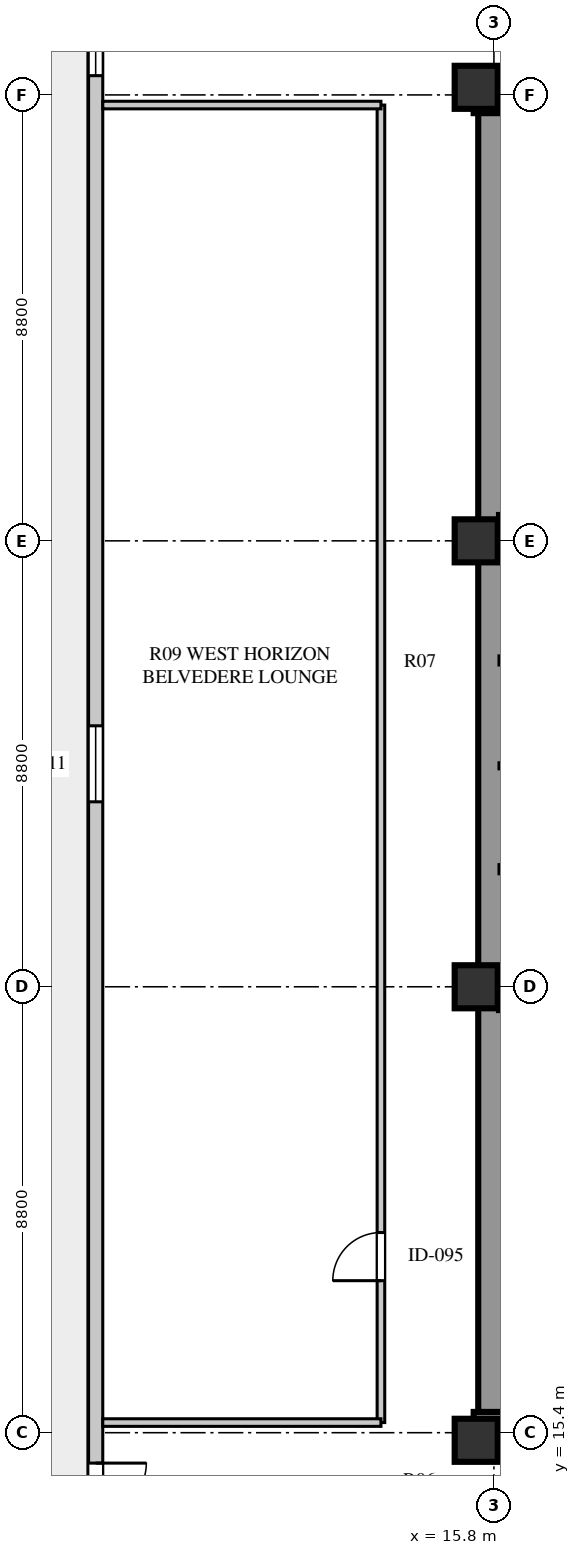
"""IFC4 building model, lengths in metres.
Left out: names, types, materials, properties, quantities, classifications, styles, units other than length and angle.
Written with IfcOpenShell. Run it as: python <this file> out.ifc"""

import sys

from ifc_helpers import new_model, si_unit, direction, frame, frame_2d, origin, origin_2d, place, context, subcontext, project, spatial, rectangle, extrude, element, fill, save


model = new_model("IFC4")
c1 = context("Model", 3, precision=1e-05, world=origin(), true_north=direction((0.0, 1.0)))
c2 = subcontext(c1, "Body", "Model", "MODEL_VIEW")
j1 = project(units=[si_unit("LENGTHUNIT", "METRE"), si_unit("PLANEANGLEUNIT", "RADIAN")], contexts=[c1])
p1 = place(None, origin())
s1 = spatial("IfcSite", under=j1, at=p1, CompositionType="ELEMENT")
p2 = place(p1, origin())
s2 = spatial("IfcBuilding", under=s1, at=p2, CompositionType="ELEMENT")
p3 = place(p2, frame((0.0, 0.0, 208.9)))
s3 = spatial("IfcBuildingStorey", under=s2, at=p3, CompositionType="ELEMENT", Elevation=208.9)
for number, where, z_axis, x_axis in (
    (1, (15.4, 15.56, 0.0), (0.0, 0.0, 1.0), (1.0, 0.0, 0.0)),
    (2, (15.4, 41.69, 0.0), (0.0, 0.0, 1.0), (1.0, 0.0, 0.0)),
):
    element("IfcWall", number, at=place(p3, frame(where, z_axis=z_axis, x_axis=x_axis)), inside=s3, PredefinedType="SHEAR", context=c2, shape_type="SweptSolid", body=[
        extrude(rectangle(XDim=9.68, YDim=0.5, at=frame_2d((4.84, 0.0))), origin(), (0.0, 0.0, 1.0), 4.96),
    ])
p4 = place(p3, frame((15.74, 15.81, 0.0), z_axis=(0.0, 0.0, 1.0), x_axis=(0.0, 1.0, 0.0)))
e3 = element("IfcWall", 3, at=p4, inside=s3, PredefinedType="SHEAR", context=c2, shape_type="SweptSolid", body=[
    extrude(rectangle(XDim=25.63, YDim=0.5, at=frame_2d((12.815, 0.0))), origin(), (0.0, 0.0, 1.0), 4.96),
])
for number, where, z_axis, x_axis in (
    (4, (15.45, 15.25, 0.0), (0.0, 0.0, 1.0), (1.0, 0.0, 0.0)),
    (5, (15.45, 24.2, 0.0), (0.0, 0.0, 1.0), (1.0, 0.0, 0.0)),
    (6, (15.45, 33.0, 0.0), (0.0, 0.0, 1.0), (1.0, 0.0, 0.0)),
    (7, (15.45, 41.95, 0.0), (0.0, 0.0, 1.0), (1.0, 0.0, 0.0)),
):
    element("IfcColumn", number, at=place(p3, frame(where, z_axis=z_axis, x_axis=x_axis)), inside=s3, PredefinedType="COLUMN", context=c2, shape_type="SweptSolid", body=[
        extrude(rectangle(XDim=0.85, YDim=0.85, at=origin_2d()), origin(), (0.0, 0.0, 1.0), 4.96),
    ])
p5 = place(p3, frame((7.94, 44.07, 0.0), z_axis=(0.0, 0.0, 1.0), x_axis=(0.0, -1.0, 0.0)))
e8 = element("IfcWall", 8, at=p5, inside=s3, PredefinedType="STANDARD", context=c2, shape_type="SweptSolid", body=[
    extrude(rectangle(XDim=30.94, YDim=0.28, at=frame_2d((15.47, 0.0))), origin(), (0.0, 0.0, 1.0), 4.96),
])
p6 = place(p5, frame((29.27, 0.0, 0.0)))
e9 = element("IfcOpeningElement", 9, at=p6, cuts=e8, PredefinedType="OPENING", context=c2, shape_type="SweptSolid", body=[
    extrude(rectangle(XDim=1.0, YDim=2.05, at=frame_2d((0.5, 1.025))), frame((0.0, 0.15, 0.0), z_axis=(0.0, -1.0, 0.0), x_axis=(1.0, 0.0, 0.0)), (0.0, 0.0, 1.0), 0.3),
])
p7 = place(p5, frame((14.72, 0.0, 0.65)))
e10 = element("IfcOpeningElement", 10, at=p7, cuts=e8, PredefinedType="OPENING", context=c2, shape_type="SweptSolid", body=[
    extrude(rectangle(XDim=1.5, YDim=1.3, at=frame_2d((0.75, 0.65))), frame((0.0, 0.15, 0.0), z_axis=(0.0, -1.0, 0.0), x_axis=(1.0, 0.0, 0.0)), (0.0, 0.0, 1.0), 0.3),
])
p8 = place(p5, frame((0.69, 0.0, 0.65)))
e11 = element("IfcOpeningElement", 11, at=p8, cuts=e8, PredefinedType="OPENING", context=c2, shape_type="SweptSolid", body=[
    extrude(rectangle(XDim=1.2, YDim=1.25, at=frame_2d((0.6, 0.625))), frame((0.0, 0.15, 0.0), z_axis=(0.0, -1.0, 0.0), x_axis=(1.0, 0.0, 0.0)), (0.0, 0.0, 1.0), 0.3),
])
p9 = place(p3, frame((15.9, 23.86, 0.0), z_axis=(0.0, 0.0, 1.0), x_axis=(1.0, 0.0, 0.0)))
e12 = element("IfcWall", 12, at=p9, inside=s3, PredefinedType="SHEAR", context=c2, shape_type="SweptSolid", body=[
    extrude(rectangle(XDim=3.52, YDim=0.24, at=frame_2d((1.76, 0.0))), origin(), (0.0, 0.0, 1.0), 5.2),
])
p10 = place(p3, frame((15.9, 26.52, 0.0), z_axis=(0.0, 0.0, 1.0), x_axis=(1.0, 0.0, 0.0)))
e13 = element("IfcWall", 13, at=p10, inside=s3, PredefinedType="SOLIDWALL", context=c2, shape_type="SweptSolid", body=[
    extrude(rectangle(XDim=8.68, YDim=0.18, at=frame_2d((4.34, 0.0))), origin(), (0.0, 0.0, 1.0), 4.96),
])
p11 = place(p10, frame((3.3, 0.0, 0.0)))
e14 = element("IfcOpeningElement", 14, at=p11, cuts=e13, PredefinedType="OPENING", context=c2, shape_type="SweptSolid", body=[
    extrude(rectangle(XDim=0.95, YDim=2.1, at=frame_2d((0.475, 1.05))), frame((0.0, 0.1, 0.0), z_axis=(0.0, -1.0, 0.0), x_axis=(1.0, 0.0, 0.0)), (0.0, 0.0, 1.0), 0.2),
])
p12 = place(p3, frame((15.9, 24.33, 0.0), z_axis=(0.0, 0.0, 1.0), x_axis=(1.0, 0.0, 0.0)))
e15 = element("IfcWall", 15, at=p12, inside=s3, PredefinedType="SOLIDWALL", context=c2, shape_type="SweptSolid", body=[
    extrude(rectangle(XDim=8.68, YDim=0.18, at=frame_2d((4.34, 0.0))), origin(), (0.0, 0.0, 1.0), 4.31),
])
p13 = place(p3, frame((15.9, 28.56, 0.0), z_axis=(0.0, 0.0, 1.0), x_axis=(1.0, 0.0, 0.0)))
e16 = element("IfcWall", 16, at=p13, inside=s3, PredefinedType="PARTITIONING", context=c2, shape_type="SweptSolid", body=[
    extrude(rectangle(XDim=1.2, YDim=0.12, at=frame_2d((0.6, 0.0))), origin(), (0.0, 0.0, 1.0), 4.96),
])
p14 = place(p3, frame((15.9, 30.64, 0.0), z_axis=(0.0, 0.0, 1.0), x_axis=(1.0, 0.0, 0.0)))
e17 = element("IfcWall", 17, at=p14, inside=s3, PredefinedType="SOLIDWALL", context=c2, shape_type="SweptSolid", body=[
    extrude(rectangle(XDim=8.68, YDim=0.18, at=frame_2d((4.34, 0.0))), origin(), (0.0, 0.0, 1.0), 4.96),
])
p15 = place(p14, frame((1.76, 0.0, 0.0)))
e18 = element("IfcOpeningElement", 18, at=p15, cuts=e17, PredefinedType="OPENING", context=c2, shape_type="SweptSolid", body=[
    extrude(rectangle(XDim=1.0, YDim=2.1, at=frame_2d((0.5, 1.05))), frame((0.0, 0.1, 0.0), z_axis=(0.0, -1.0, 0.0), x_axis=(1.0, 0.0, 0.0)), (0.0, 0.0, 1.0), 0.2),
])
p16 = place(p14, frame((3.6, 0.0, 0.0)))
e19 = element("IfcOpeningElement", 19, at=p16, cuts=e17, PredefinedType="OPENING", context=c2, shape_type="SweptSolid", body=[
    extrude(rectangle(XDim=1.0, YDim=2.1, at=frame_2d((0.5, 1.05))), frame((0.0, 0.1, 0.0), z_axis=(0.0, -1.0, 0.0), x_axis=(1.0, 0.0, 0.0)), (0.0, 0.0, 1.0), 0.2),
])
p17 = place(p14, frame((5.44, 0.0, 0.0)))
e20 = element("IfcOpeningElement", 20, at=p17, cuts=e17, PredefinedType="OPENING", context=c2, shape_type="SweptSolid", body=[
    extrude(rectangle(XDim=1.0, YDim=2.1, at=frame_2d((0.5, 1.05))), frame((0.0, 0.1, 0.0), z_axis=(0.0, -1.0, 0.0), x_axis=(1.0, 0.0, 0.0)), (0.0, 0.0, 1.0), 0.2),
])
p18 = place(p14, frame((7.28, 0.0, 0.0)))
e21 = element("IfcOpeningElement", 21, at=p18, cuts=e17, PredefinedType="OPENING", context=c2, shape_type="SweptSolid", body=[
    extrude(rectangle(XDim=1.0, YDim=2.1, at=frame_2d((0.5, 1.05))), frame((0.0, 0.1, 0.0), z_axis=(0.0, -1.0, 0.0), x_axis=(1.0, 0.0, 0.0)), (0.0, 0.0, 1.0), 0.2),
])
p19 = place(p3, frame((15.9, 32.82, 0.0), z_axis=(0.0, 0.0, 1.0), x_axis=(1.0, 0.0, 0.0)))
e22 = element("IfcWall", 22, at=p19, inside=s3, PredefinedType="SOLIDWALL", context=c2, shape_type="SweptSolid", body=[
    extrude(rectangle(XDim=8.68, YDim=0.18, at=frame_2d((4.34, 0.0))), origin(), (0.0, 0.0, 1.0), 4.31),
])
p20 = place(p3, frame((15.9, 33.39, 0.0), z_axis=(0.0, 0.0, 1.0), x_axis=(1.0, 0.0, 0.0)))
e23 = element("IfcWall", 23, at=p20, inside=s3, PredefinedType="SHEAR", context=c2, shape_type="SweptSolid", body=[
    extrude(rectangle(XDim=3.52, YDim=0.24, at=frame_2d((1.76, 0.0))), origin(), (0.0, 0.0, 1.0), 5.2),
])
p21 = place(p3, frame((13.57, 15.6, 0.0), z_axis=(0.0, 0.0, 1.0), x_axis=(0.0, 1.0, 0.0)))
e24 = element("IfcWall", 24, at=p21, inside=s3, PredefinedType="PARTITIONING", context=c2, shape_type="SweptSolid", body=[
    extrude(rectangle(XDim=26.0, YDim=0.15, at=frame_2d((13.0, 0.0))), origin(), (0.0, 0.0, 1.0), 4.96),
])
p22 = place(p21, frame((2.8, 0.0, 0.0)))
e25 = element("IfcOpeningElement", 25, at=p22, cuts=e24, PredefinedType="OPENING", context=c2, shape_type="SweptSolid", body=[
    extrude(rectangle(XDim=0.95, YDim=2.08, at=frame_2d((0.475, 1.04))), frame((0.0, 0.085, 0.0), z_axis=(0.0, -1.0, 0.0), x_axis=(1.0, 0.0, 0.0)), (0.0, 0.0, 1.0), 0.17),
])
for number, where, z_axis, x_axis in (
    (26, (8.08, 15.6, 0.0), (0.0, 0.0, 1.0), (1.0, 0.0, 0.0)),
    (27, (8.08, 41.6, 0.0), (0.0, 0.0, 1.0), (1.0, 0.0, 0.0)),
):
    element("IfcWall", number, at=place(p3, frame(where, z_axis=z_axis, x_axis=x_axis)), inside=s3, PredefinedType="PARTITIONING", context=c2, shape_type="SweptSolid", body=[
        extrude(rectangle(XDim=5.49, YDim=0.15, at=frame_2d((2.745, 0.0))), origin(), (0.0, 0.0, 1.0), 3.88),
    ])
p23 = place(p6, frame((1.0, 0.0, 0.0), z_axis=(0.0, 0.0, 1.0), x_axis=(-1.0, 0.0, 0.0)))
e28 = element("IfcDoor", 28, at=p23, inside=s3, OperationType="SINGLE_SWING_RIGHT", PredefinedType="DOOR", context=c2, shape_type="SweptSolid", body=[
    extrude(rectangle(XDim=1.0, YDim=2.05, at=frame_2d((0.5, 1.025))), frame((0.0, 0.025, 0.0), z_axis=(0.0, -1.0, 0.0), x_axis=(1.0, 0.0, 0.0)), (0.0, 0.0, 1.0), 0.05),
])
fill(e9, e28)
p24 = place(p7, origin())
e29 = element("IfcWindow", 29, at=p24, inside=s3, PartitioningType="SINGLE_PANEL", PredefinedType="WINDOW", context=c2, shape_type="SweptSolid", body=[
    extrude(rectangle(XDim=1.5, YDim=1.3, at=frame_2d((0.75, 0.65))), frame((0.0, 0.03, 0.0), z_axis=(0.0, -1.0, 0.0), x_axis=(1.0, 0.0, 0.0)), (0.0, 0.0, 1.0), 0.06),
])
fill(e10, e29)
p25 = place(p8, origin())
e30 = element("IfcWindow", 30, at=p25, inside=s3, PartitioningType="SINGLE_PANEL", PredefinedType="WINDOW", context=c2, shape_type="SweptSolid", body=[
    extrude(rectangle(XDim=1.2, YDim=1.25, at=frame_2d((0.6, 0.625))), frame((0.0, 0.03, 0.0), z_axis=(0.0, -1.0, 0.0), x_axis=(1.0, 0.0, 0.0)), (0.0, 0.0, 1.0), 0.06),
])
fill(e11, e30)
p26 = place(p22, origin())
e31 = element("IfcDoor", 31, at=p26, inside=s3, OperationType="SINGLE_SWING_LEFT", PredefinedType="DOOR", context=c2, shape_type="SweptSolid", body=[
    extrude(rectangle(XDim=0.95, YDim=2.08, at=frame_2d((0.475, 1.04))), frame((0.0, 0.025, 0.0), z_axis=(0.0, -1.0, 0.0), x_axis=(1.0, 0.0, 0.0)), (0.0, 0.0, 1.0), 0.05),
])
fill(e25, e31)
save(model, sys.argv[1])
